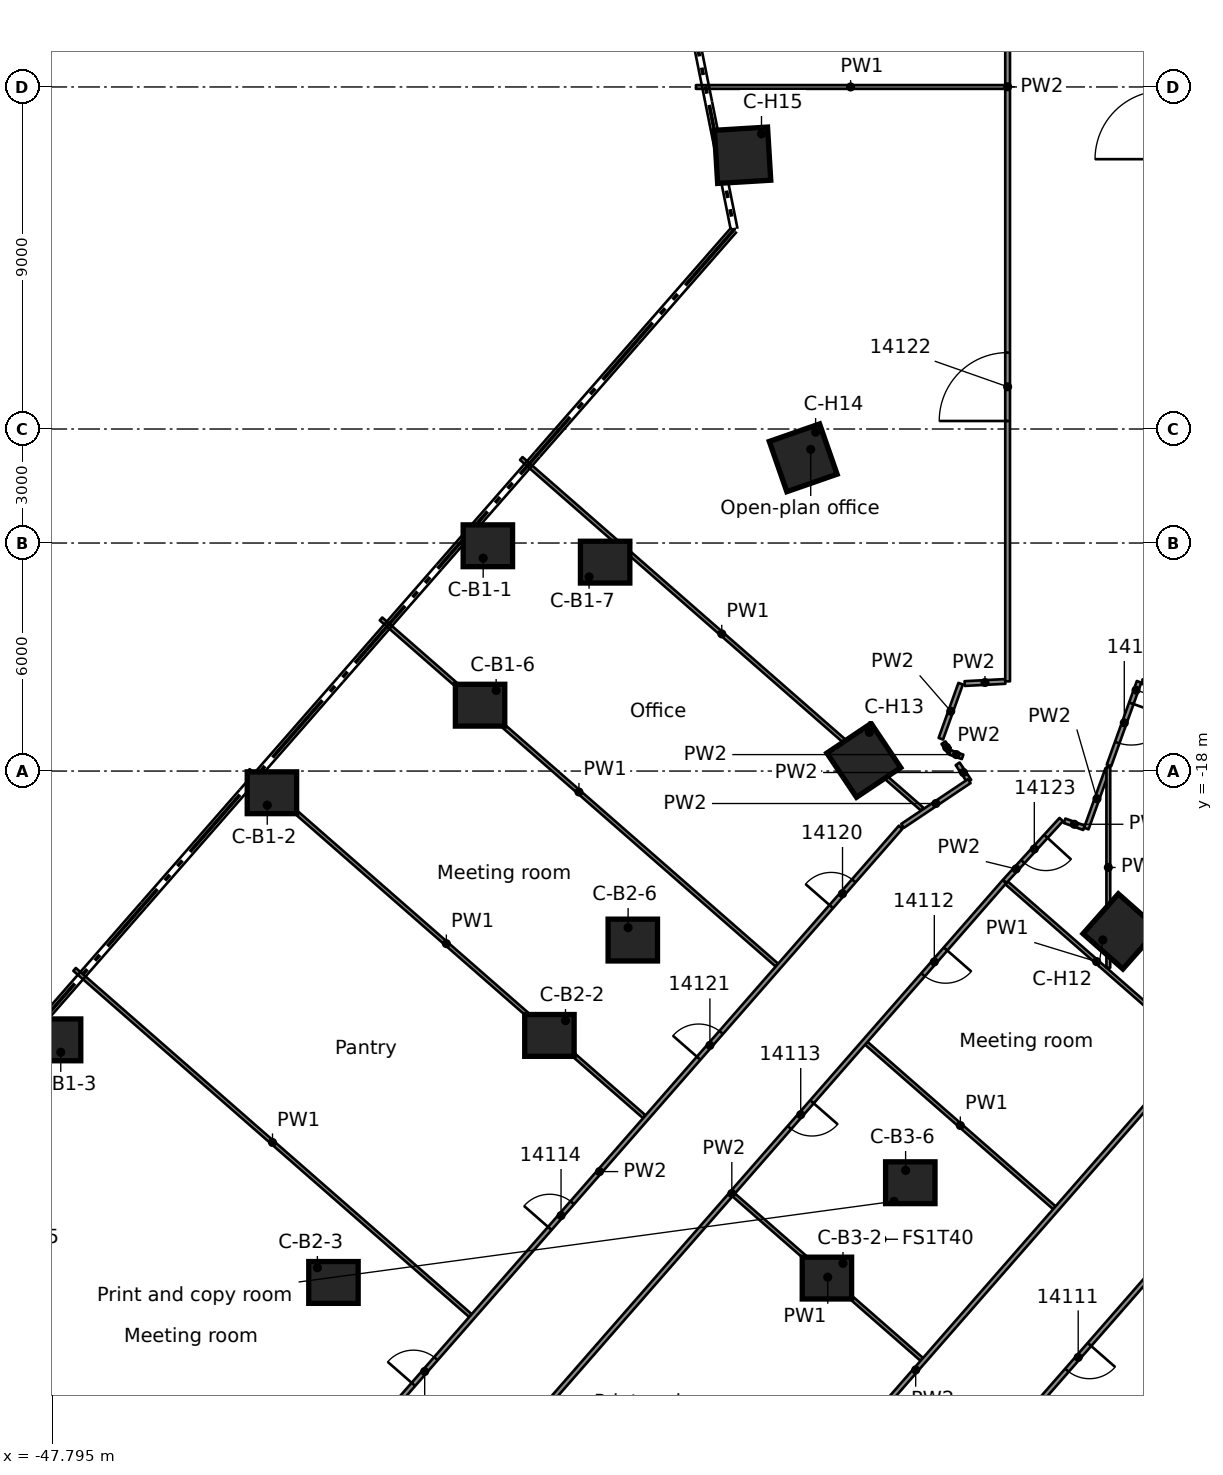
"""IFC4 building model, lengths in metres.
Left out: names, types, materials, properties, quantities, classifications, styles, units other than length and angle.
Written with IfcOpenShell. Run it as: python <this file> out.ifc"""

import sys

from ifc_helpers import new_model, si_unit, direction, frame, frame_2d, origin, origin_2d, place, context, subcontext, project, spatial, rectangle, extrude, element, fill, save


model = new_model("IFC4")
c1 = context("Model", 3, precision=1e-05, world=origin(), true_north=direction((0.0, 1.0)))
c2 = subcontext(c1, "Body", "Model", "MODEL_VIEW")
j1 = project(units=[si_unit("LENGTHUNIT", "METRE"), si_unit("PLANEANGLEUNIT", "RADIAN")], contexts=[c1])
p1 = place(None, origin())
s1 = spatial("IfcSite", under=j1, at=p1, CompositionType="ELEMENT")
p2 = place(p1, origin())
s2 = spatial("IfcBuilding", under=s1, at=p2, CompositionType="ELEMENT")
p3 = place(p2, frame((0.0, 0.0, 69.3)))
s3 = spatial("IfcBuildingStorey", under=s2, at=p3, CompositionType="ELEMENT", Elevation=69.3)
for number, where, z_axis, x_axis in (
    (1, (-36.327, -12.072, 0.0), (0.0, 0.0, 1.0), (1.0, 0.0, 0.0)),
    (2, (-42.009, -18.571, 0.0), (0.0, 0.0, 1.0), (1.0, 0.0, 0.0)),
    (3, (-47.689, -25.073, 0.0), (0.0, 0.0, 1.0), (1.0, 0.0, 0.0)),
    (4, (-36.532, -16.267, 0.0), (0.0, 0.0, 1.0), (1.0, 0.0, 0.0)),
    (5, (-33.241, -12.503, 0.0), (0.0, 0.0, 1.0), (1.0, 0.0, 0.0)),
    (6, (-34.707, -24.956, 0.0), (0.0, 0.0, 1.0), (1.0, 0.0, 0.0)),
    (7, (-40.39, -31.456, 0.0), (0.0, 0.0, 1.0), (1.0, 0.0, 0.0)),
    (8, (-32.513, -22.447, 0.0), (0.0, 0.0, 1.0), (1.0, 0.0, 0.0)),
    (9, (-27.405, -31.341, 0.0), (0.0, 0.0, 1.0), (1.0, 0.0, 0.0)),
    (10, (-25.211, -28.832, 0.0), (0.0, 0.0, 1.0), (1.0, 0.0, 0.0)),
):
    element("IfcColumn", number, at=place(p3, frame(where, z_axis=z_axis, x_axis=x_axis)), inside=s3, PredefinedType="COLUMN", context=c2, shape_type="SweptSolid", body=[
        extrude(rectangle(XDim=1.3, YDim=1.1, at=origin_2d()), origin(), (0.0, 0.0, 1.0), 3.5),
    ])
for number, where, z_axis, x_axis in (
    (11, (-19.677, -22.219, 0.0), (0.0, 0.0, 1.0), (-0.663, -0.749, 0.0)),
    (12, (-26.434, -17.718, 0.0), (0.0, 0.0, 1.0), (-0.831, -0.557, 0.0)),
    (13, (-28.029, -9.758, 0.0), (0.0, 0.0, 1.0), (-0.944, -0.329, 0.0)),
    (14, (-29.624, -1.797, 0.0), (0.0, 0.0, 1.0), (-0.998, -0.061, 0.0)),
):
    element("IfcColumn", number, at=place(p3, frame(where, z_axis=z_axis, x_axis=x_axis)), inside=s3, PredefinedType="COLUMN", context=c2, shape_type="SweptSolid", body=[
        extrude(rectangle(XDim=1.4, YDim=1.4, at=origin_2d()), origin(), (0.0, 0.0, 1.0), 3.5),
    ])
p4 = place(p3, frame((-24.338, -17.253, 0.0), z_axis=(0.0, 0.0, 1.0), x_axis=(0.55580542013, -0.831312417178, 0.0)))
e15 = element("IfcWall", 15, at=p4, inside=s3, PredefinedType="PARTITIONING", context=c2, shape_type="SweptSolid", body=[
    extrude(rectangle(XDim=0.306, YDim=0.125, at=frame_2d((0.153, 0.0))), origin(), (0.0, 0.0, 1.0), 3.03),
])
p5 = place(p3, frame((-23.965, -17.81, 0.0), z_axis=(0.0, 0.0, 1.0), x_axis=(0.55613676815, -0.831090786323, 0.0)))
e16 = element("IfcWall", 16, at=p5, inside=s3, PredefinedType="PARTITIONING", context=c2, shape_type="SweptSolid", body=[
    extrude(rectangle(XDim=0.549, YDim=0.125, at=frame_2d((0.274, 0.0))), origin(), (0.0, 0.0, 1.0), 3.03),
])
p6 = place(p3, frame((-47.202, -23.219, 0.0), z_axis=(0.0, 0.0, 1.0), x_axis=(0.752795260656, -0.658254734531, 0.0)))
e17 = element("IfcWall", 17, at=p6, inside=s3, PredefinedType="PARTITIONING", context=c2, shape_type="SweptSolid", body=[
    extrude(rectangle(XDim=13.836, YDim=0.1, at=frame_2d((6.918, 0.0))), origin(), (0.0, 0.0, 1.0), 3.03),
])
p7 = place(p3, frame((-42.628, -17.987, 0.0), z_axis=(0.0, 0.0, 1.0), x_axis=(0.752825840036, -0.65821976161, 0.0)))
e18 = element("IfcWall", 18, at=p7, inside=s3, PredefinedType="PARTITIONING", context=c2, shape_type="SweptSolid", body=[
    extrude(rectangle(XDim=13.837, YDim=0.1, at=frame_2d((6.918, 0.0))), origin(), (0.0, 0.0, 1.0), 3.03),
])
p8 = place(p3, frame((-29.858, -29.153, 0.0), z_axis=(0.0, 0.0, 1.0), x_axis=(0.752836606275, -0.658207447734, 0.0)))
e19 = element("IfcWall", 19, at=p8, inside=s3, PredefinedType="PARTITIONING", context=c2, shape_type="SweptSolid", body=[
    extrude(rectangle(XDim=6.574, YDim=0.1, at=frame_2d((3.287, 0.0))), origin(), (0.0, 0.0, 1.0), 3.03),
])
p9 = place(p3, frame((-39.139, -13.997, 0.0), z_axis=(0.0, 0.0, 1.0), x_axis=(0.752825840036, -0.65821976161, 0.0)))
e20 = element("IfcWall", 20, at=p9, inside=s3, PredefinedType="PARTITIONING", context=c2, shape_type="SweptSolid", body=[
    extrude(rectangle(XDim=13.837, YDim=0.1, at=frame_2d((6.918, 0.0))), origin(), (0.0, 0.0, 1.0), 3.03),
])
p10 = place(p3, frame((-26.369, -25.163, 0.0), z_axis=(0.0, 0.0, 1.0), x_axis=(0.752836606275, -0.658207447734, 0.0)))
e21 = element("IfcWall", 21, at=p10, inside=s3, PredefinedType="PARTITIONING", context=c2, shape_type="SweptSolid", body=[
    extrude(rectangle(XDim=6.574, YDim=0.1, at=frame_2d((3.287, 0.0))), origin(), (0.0, 0.0, 1.0), 3.03),
])
p11 = place(p3, frame((-19.067, -31.548, 0.0), z_axis=(0.0, 0.0, 1.0), x_axis=(0.752795260656, -0.658254734531, 0.0)))
e22 = element("IfcWall", 22, at=p11, inside=s3, PredefinedType="PARTITIONING", context=c2, shape_type="SweptSolid", body=[
    extrude(rectangle(XDim=13.836, YDim=0.1, at=frame_2d((6.918, 0.0))), origin(), (0.0, 0.0, 1.0), 3.03),
])
p12 = place(p3, frame((-35.448, -9.776, 0.0), z_axis=(0.0, 0.0, 1.0), x_axis=(0.752752526875, -0.658303602666, 0.0)))
e23 = element("IfcWall", 23, at=p12, inside=s3, PredefinedType="PARTITIONING", context=c2, shape_type="SweptSolid", body=[
    extrude(rectangle(XDim=14.018, YDim=0.1, at=frame_2d((7.009, 0.0))), origin(), (0.0, 0.0, 1.0), 3.03),
])
p13 = place(p3, frame((-22.678, -20.942, 0.0), z_axis=(0.0, 0.0, 1.0), x_axis=(0.752857732361, -0.658183283611, 0.0)))
e24 = element("IfcWall", 24, at=p13, inside=s3, PredefinedType="PARTITIONING", context=c2, shape_type="SweptSolid", body=[
    extrude(rectangle(XDim=6.295, YDim=0.1, at=frame_2d((3.147, 0.0))), origin(), (0.0, 0.0, 1.0), 3.03),
])
p14 = place(p3, frame((-21.151, -19.308, 0.0), z_axis=(0.0, 0.0, 1.0), x_axis=(0.940956165673, -0.33852842463, 0.0)))
e25 = element("IfcWall", 25, at=p14, inside=s3, PredefinedType="PARTITIONING", context=c2, shape_type="SweptSolid", body=[
    extrude(rectangle(XDim=0.543, YDim=0.125, at=frame_2d((0.271, 0.0))), origin(), (0.0, 0.0, 1.0), 3.03),
])
p15 = place(p3, frame((-24.168, -17.507, 0.0), z_axis=(0.0, 0.0, 1.0), x_axis=(0.94089620512, -0.338695041579, 0.0)))
e26 = element("IfcWall", 26, at=p15, inside=s3, PredefinedType="PARTITIONING", context=c2, shape_type="SweptSolid", body=[
    extrude(rectangle(XDim=0.354, YDim=0.125, at=frame_2d((0.177, 0.0))), origin(), (0.0, 0.0, 1.0), 3.03),
])
p16 = place(p3, frame((-22.712, -15.642, 0.0), z_axis=(0.0, 0.0, 1.0), x_axis=(-0.998632921129, -0.052271300329, 0.0)))
e27 = element("IfcWall", 27, at=p16, inside=s3, PredefinedType="PARTITIONING", context=c2, shape_type="SweptSolid", body=[
    extrude(rectangle(XDim=1.07, YDim=0.125, at=frame_2d((0.535, 0.0))), origin(), (0.0, 0.0, 1.0), 3.03),
])
p17 = place(p3, frame((-19.102, -15.651, 0.0), z_axis=(0.0, 0.0, 1.0), x_axis=(1.0, 0.0, 0.0)))
e28 = element("IfcWall", 28, at=p17, inside=s3, PredefinedType="PARTITIONING", context=c2, shape_type="SweptSolid", body=[
    extrude(rectangle(XDim=1.814, YDim=0.125, at=frame_2d((0.907, 0.0))), origin(), (0.0, 0.0, 1.0), 3.03),
])
p18 = place(p3, frame((-30.851, 0.0, 0.0), z_axis=(0.0, 0.0, 1.0), x_axis=(1.0, 0.0, 0.0)))
e29 = element("IfcWall", 29, at=p18, inside=s3, PredefinedType="PARTITIONING", context=c2, shape_type="SweptSolid", body=[
    extrude(rectangle(XDim=8.139, YDim=0.1, at=frame_2d((4.07, 0.0))), origin(), (0.0, 0.0, 1.0), 3.03),
])
p19 = place(p3, frame((-23.66, -18.266, 0.0), z_axis=(0.0, 0.0, 1.0), x_axis=(-0.83066036782, -0.556779447658, 0.0)))
e30 = element("IfcWall", 30, at=p19, inside=s3, PredefinedType="PARTITIONING", context=c2, shape_type="SweptSolid", body=[
    extrude(rectangle(XDim=2.112, YDim=0.125, at=frame_2d((1.056, 0.0))), origin(), (0.0, 0.0, 1.0), 3.03),
])
p20 = place(p3, frame((-21.239, -19.276, 0.0), z_axis=(0.0, 0.0, 1.0), x_axis=(-0.67486064048, -0.737945198461, 0.0)))
e31 = element("IfcWall", 31, at=p20, inside=s3, PredefinedType="PARTITIONING", context=c2, shape_type="SweptSolid", body=[
    extrude(rectangle(XDim=2.202, YDim=0.125, at=frame_2d((1.101, 0.0))), origin(), (0.0, 0.0, 1.0), 3.03),
])
p21 = place(p20, frame((0.6, 0.0, 0.0)))
e32 = element("IfcOpeningElement", 32, at=p21, cuts=e31, PredefinedType="OPENING", context=c2, shape_type="SweptSolid", body=[
    extrude(rectangle(XDim=0.9, YDim=2.1, at=frame_2d((0.45, 1.05))), frame((0.0, 0.073, 0.0), z_axis=(0.0, -1.0, 0.0), x_axis=(1.0, 0.0, 0.0)), (0.0, 0.0, 1.0), 0.145),
])
p22 = place(p3, frame((-15.464, -27.333, 0.0), z_axis=(0.0, 0.0, 1.0), x_axis=(-0.658239133646, -0.752808902004, 0.0)))
e33 = element("IfcWall", 33, at=p22, inside=s3, PredefinedType="PARTITIONING", context=c2, shape_type="SweptSolid", body=[
    extrude(rectangle(XDim=24.745, YDim=0.125, at=frame_2d((12.372, 0.0))), origin(), (0.0, 0.0, 1.0), 3.03),
])
p23 = place(p22, frame((2.288, 0.0, 0.0)))
e34 = element("IfcOpeningElement", 34, at=p23, cuts=e33, PredefinedType="OPENING", context=c2, shape_type="SweptSolid", body=[
    extrude(rectangle(XDim=1.1, YDim=2.1, at=frame_2d((0.55, 1.05))), frame((0.0, 0.073, 0.0), z_axis=(0.0, -1.0, 0.0), x_axis=(1.0, 0.0, 0.0)), (0.0, 0.0, 1.0), 0.145),
])
p24 = place(p22, frame((13.944, 0.0, 0.0)))
e35 = element("IfcOpeningElement", 35, at=p24, cuts=e33, PredefinedType="OPENING", context=c2, shape_type="SweptSolid", body=[
    extrude(rectangle(XDim=0.9, YDim=2.1, at=frame_2d((0.45, 1.05))), frame((0.0, 0.073, 0.0), z_axis=(0.0, -1.0, 0.0), x_axis=(1.0, 0.0, 0.0)), (0.0, 0.0, 1.0), 0.145),
])
p25 = place(p22, frame((7.646, 0.0, 0.0)))
e36 = element("IfcOpeningElement", 36, at=p25, cuts=e33, PredefinedType="OPENING", context=c2, shape_type="SweptSolid", body=[
    extrude(rectangle(XDim=0.9, YDim=2.1, at=frame_2d((0.45, 1.05))), frame((0.0, 0.073, 0.0), z_axis=(0.0, -1.0, 0.0), x_axis=(1.0, 0.0, 0.0)), (0.0, 0.0, 1.0), 0.145),
])
p26 = place(p22, frame((20.895, 0.0, 0.0)))
e37 = element("IfcOpeningElement", 37, at=p26, cuts=e33, PredefinedType="OPENING", context=c2, shape_type="SweptSolid", body=[
    extrude(rectangle(XDim=0.9, YDim=2.1, at=frame_2d((0.45, 1.05))), frame((0.0, 0.073, 0.0), z_axis=(0.0, -1.0, 0.0), x_axis=(1.0, 0.0, 0.0)), (0.0, 0.0, 1.0), 0.145),
])
p27 = place(p3, frame((-32.036, -41.726, 0.0), z_axis=(0.0, 0.0, 1.0), x_axis=(0.658231851406, 0.752815269369, 0.0)))
e38 = element("IfcWall", 38, at=p27, inside=s3, PredefinedType="PARTITIONING", context=c2, shape_type="SweptSolid", body=[
    extrude(rectangle(XDim=21.169, YDim=0.125, at=frame_2d((10.584, 0.0))), origin(), (0.0, 0.0, 1.0), 3.03),
])
p28 = place(p3, frame((-22.736, -20.913, 0.0), z_axis=(0.0, 0.0, 1.0), x_axis=(-0.658236458127, -0.752811241409, 0.0)))
e39 = element("IfcWall", 39, at=p28, inside=s3, PredefinedType="PARTITIONING", context=c2, shape_type="SweptSolid", body=[
    extrude(rectangle(XDim=21.79, YDim=0.125, at=frame_2d((10.895, 0.0))), origin(), (0.0, 0.0, 1.0), 3.03),
])
p29 = place(p28, frame((2.35, 0.0, 0.0)))
e40 = element("IfcOpeningElement", 40, at=p29, cuts=e39, PredefinedType="OPENING", context=c2, shape_type="SweptSolid", body=[
    extrude(rectangle(XDim=0.9, YDim=2.1, at=frame_2d((0.45, 1.05))), frame((0.0, 0.073, 0.0), z_axis=(0.0, -1.0, 0.0), x_axis=(1.0, 0.0, 0.0)), (0.0, 0.0, 1.0), 0.145),
])
p30 = place(p28, frame((7.691, 0.0, 0.0)))
e41 = element("IfcOpeningElement", 41, at=p30, cuts=e39, PredefinedType="OPENING", context=c2, shape_type="SweptSolid", body=[
    extrude(rectangle(XDim=0.9, YDim=2.1, at=frame_2d((0.45, 1.05))), frame((0.0, 0.073, 0.0), z_axis=(0.0, -1.0, 0.0), x_axis=(1.0, 0.0, 0.0)), (0.0, 0.0, 1.0), 0.145),
])
p31 = place(p3, frame((-41.314, -37.6, 0.0), z_axis=(0.0, 0.0, 1.0), x_axis=(0.658340906106, 0.752719902319, 0.0)))
e42 = element("IfcWall", 42, at=p31, inside=s3, PredefinedType="PARTITIONING", context=c2, shape_type="SweptSolid", body=[
    extrude(rectangle(XDim=24.075, YDim=0.125, at=frame_2d((12.038, 0.0))), origin(), (0.0, 0.0, 1.0), 3.03),
])
p32 = place(p31, frame((10.05, 0.0, 0.0)))
e43 = element("IfcOpeningElement", 43, at=p32, cuts=e42, PredefinedType="OPENING", context=c2, shape_type="SweptSolid", body=[
    extrude(rectangle(XDim=0.9, YDim=2.1, at=frame_2d((0.45, 1.05))), frame((0.0, 0.073, 0.0), z_axis=(0.0, -1.0, 0.0), x_axis=(1.0, 0.0, 0.0)), (0.0, 0.0, 1.0), 0.145),
])
p33 = place(p31, frame((4.6, 0.0, 0.0)))
e44 = element("IfcOpeningElement", 44, at=p33, cuts=e42, PredefinedType="OPENING", context=c2, shape_type="SweptSolid", body=[
    extrude(rectangle(XDim=0.9, YDim=2.1, at=frame_2d((0.45, 1.05))), frame((0.0, 0.073, 0.0), z_axis=(0.0, -1.0, 0.0), x_axis=(1.0, 0.0, 0.0)), (0.0, 0.0, 1.0), 0.145),
])
p34 = place(p31, frame((21.301, 0.0, 0.0)))
e45 = element("IfcOpeningElement", 45, at=p34, cuts=e42, PredefinedType="OPENING", context=c2, shape_type="SweptSolid", body=[
    extrude(rectangle(XDim=0.9, YDim=2.1, at=frame_2d((0.45, 1.05))), frame((0.0, 0.073, 0.0), z_axis=(0.0, -1.0, 0.0), x_axis=(1.0, 0.0, 0.0)), (0.0, 0.0, 1.0), 0.145),
])
p35 = place(p31, frame((16.0, 0.0, 0.0)))
e46 = element("IfcOpeningElement", 46, at=p35, cuts=e42, PredefinedType="OPENING", context=c2, shape_type="SweptSolid", body=[
    extrude(rectangle(XDim=0.9, YDim=2.1, at=frame_2d((0.45, 1.05))), frame((0.0, 0.073, 0.0), z_axis=(0.0, -1.0, 0.0), x_axis=(1.0, 0.0, 0.0)), (0.0, 0.0, 1.0), 0.145),
])
p36 = place(p3, frame((-19.191, -15.651, 0.0), z_axis=(0.0, 0.0, 1.0), x_axis=(-0.338423918893, -0.940993757217, 0.0)))
e47 = element("IfcWall", 47, at=p36, inside=s3, PredefinedType="PARTITIONING", context=c2, shape_type="SweptSolid", body=[
    extrude(rectangle(XDim=2.34, YDim=0.125, at=frame_2d((1.17, 0.0))), origin(), (0.0, 0.0, 1.0), 3.03),
])
p37 = place(p36, frame((0.6, 0.0, 0.0)))
e48 = element("IfcOpeningElement", 48, at=p37, cuts=e47, PredefinedType="OPENING", context=c2, shape_type="SweptSolid", body=[
    extrude(rectangle(XDim=1.1, YDim=2.1, at=frame_2d((0.55, 1.05))), frame((0.0, 0.073, 0.0), z_axis=(0.0, -1.0, 0.0), x_axis=(1.0, 0.0, 0.0)), (0.0, 0.0, 1.0), 0.145),
])
p38 = place(p3, frame((-20.58, -19.513, 0.0), z_axis=(0.0, 0.0, 1.0), x_axis=(0.338137852557, 0.941096590509, 0.0)))
e49 = element("IfcWall", 49, at=p38, inside=s3, PredefinedType="PARTITIONING", context=c2, shape_type="SweptSolid", body=[
    extrude(rectangle(XDim=1.665, YDim=0.125, at=frame_2d((0.833, 0.0))), origin(), (0.0, 0.0, 1.0), 3.03),
])
p39 = place(p3, frame((-24.407, -17.15, 0.0), z_axis=(0.0, 0.0, 1.0), x_axis=(0.338354498813, 0.941018720926, 0.0)))
e50 = element("IfcWall", 50, at=p39, inside=s3, PredefinedType="PARTITIONING", context=c2, shape_type="SweptSolid", body=[
    extrude(rectangle(XDim=1.54, YDim=0.125, at=frame_2d((0.77, 0.0))), origin(), (0.0, 0.0, 1.0), 3.03),
])
p40 = place(p3, frame((-20.0, -23.174, 0.0), z_axis=(0.0, 0.0, 1.0), x_axis=(0.0, 1.0, 0.0)))
e51 = element("IfcWall", 51, at=p40, inside=s3, PredefinedType="PARTITIONING", context=c2, shape_type="SweptSolid", body=[
    extrude(rectangle(XDim=5.274, YDim=0.1, at=frame_2d((2.637, 0.0))), origin(), (0.0, 0.0, 1.0), 3.03),
])
p41 = place(p3, frame((-22.65, -15.639, 0.0), z_axis=(0.0, 0.0, 1.0), x_axis=(0.0, 1.0, 0.0)))
e52 = element("IfcWall", 52, at=p41, inside=s3, PredefinedType="PARTITIONING", context=c2, shape_type="SweptSolid", body=[
    extrude(rectangle(XDim=31.29, YDim=0.125, at=frame_2d((15.645, 0.0))), origin(), (0.0, 0.0, 1.0), 3.03),
])
p42 = place(p41, frame((6.85, 0.0, 0.0)))
e53 = element("IfcOpeningElement", 53, at=p42, cuts=e52, PredefinedType="OPENING", context=c2, shape_type="SweptSolid", body=[
    extrude(rectangle(XDim=1.8, YDim=2.1, at=frame_2d((0.9, 1.05))), frame((0.0, 0.073, 0.0), z_axis=(0.0, -1.0, 0.0), x_axis=(1.0, 0.0, 0.0)), (0.0, 0.0, 1.0), 0.145),
])
p43 = place(p41, frame((22.489, 0.0, 0.0)))
e54 = element("IfcOpeningElement", 54, at=p43, cuts=e52, PredefinedType="OPENING", context=c2, shape_type="SweptSolid", body=[
    extrude(rectangle(XDim=1.8, YDim=2.1, at=frame_2d((0.9, 1.05))), frame((0.0, 0.073, 0.0), z_axis=(0.0, -1.0, 0.0), x_axis=(1.0, 0.0, 0.0)), (0.0, 0.0, 1.0), 0.145),
])
p44 = place(p25, origin())
e55 = element("IfcDoor", 55, at=p44, inside=s3, OperationType="SINGLE_SWING_LEFT", PredefinedType="DOOR", context=c2, shape_type="SweptSolid", body=[
    extrude(rectangle(XDim=0.9, YDim=2.1, at=frame_2d((0.45, 1.05))), frame((0.0, 0.025, 0.0), z_axis=(0.0, -1.0, 0.0), x_axis=(1.0, 0.0, 0.0)), (0.0, 0.0, 1.0), 0.05),
])
fill(e36, e55)
p45 = place(p29, origin())
e56 = element("IfcDoor", 56, at=p45, inside=s3, OperationType="SINGLE_SWING_LEFT", PredefinedType="DOOR", context=c2, shape_type="SweptSolid", body=[
    extrude(rectangle(XDim=0.9, YDim=2.1, at=frame_2d((0.45, 1.05))), frame((0.0, 0.025, 0.0), z_axis=(0.0, -1.0, 0.0), x_axis=(1.0, 0.0, 0.0)), (0.0, 0.0, 1.0), 0.05),
])
fill(e40, e56)
p46 = place(p30, origin())
e57 = element("IfcDoor", 57, at=p46, inside=s3, OperationType="SINGLE_SWING_LEFT", PredefinedType="DOOR", context=c2, shape_type="SweptSolid", body=[
    extrude(rectangle(XDim=0.9, YDim=2.1, at=frame_2d((0.45, 1.05))), frame((0.0, 0.025, 0.0), z_axis=(0.0, -1.0, 0.0), x_axis=(1.0, 0.0, 0.0)), (0.0, 0.0, 1.0), 0.05),
])
fill(e41, e57)
p47 = place(p32, origin())
e58 = element("IfcDoor", 58, at=p47, inside=s3, OperationType="SINGLE_SWING_LEFT", PredefinedType="DOOR", context=c2, shape_type="SweptSolid", body=[
    extrude(rectangle(XDim=0.9, YDim=2.1, at=frame_2d((0.45, 1.05))), frame((0.0, 0.025, 0.0), z_axis=(0.0, -1.0, 0.0), x_axis=(1.0, 0.0, 0.0)), (0.0, 0.0, 1.0), 0.05),
])
fill(e43, e58)
p48 = place(p33, origin())
e59 = element("IfcDoor", 59, at=p48, inside=s3, OperationType="SINGLE_SWING_LEFT", PredefinedType="DOOR", context=c2, shape_type="SweptSolid", body=[
    extrude(rectangle(XDim=0.9, YDim=2.1, at=frame_2d((0.45, 1.05))), frame((0.0, 0.025, 0.0), z_axis=(0.0, -1.0, 0.0), x_axis=(1.0, 0.0, 0.0)), (0.0, 0.0, 1.0), 0.05),
])
fill(e44, e59)
p49 = place(p34, origin())
e60 = element("IfcDoor", 60, at=p49, inside=s3, OperationType="SINGLE_SWING_RIGHT", PredefinedType="DOOR", context=c2, shape_type="SweptSolid", body=[
    extrude(rectangle(XDim=0.9, YDim=2.1, at=frame_2d((0.45, 1.05))), frame((0.0, 0.025, 0.0), z_axis=(0.0, -1.0, 0.0), x_axis=(1.0, 0.0, 0.0)), (0.0, 0.0, 1.0), 0.05),
])
fill(e45, e60)
p50 = place(p35, origin())
e61 = element("IfcDoor", 61, at=p50, inside=s3, OperationType="SINGLE_SWING_RIGHT", PredefinedType="DOOR", context=c2, shape_type="SweptSolid", body=[
    extrude(rectangle(XDim=0.9, YDim=2.1, at=frame_2d((0.45, 1.05))), frame((0.0, 0.025, 0.0), z_axis=(0.0, -1.0, 0.0), x_axis=(1.0, 0.0, 0.0)), (0.0, 0.0, 1.0), 0.05),
])
fill(e46, e61)
p51 = place(p42, origin())
e62 = element("IfcDoor", 62, at=p51, inside=s3, OperationType="DOUBLE_DOOR_SINGLE_SWING", PredefinedType="DOOR", context=c2, shape_type="SweptSolid", body=[
    extrude(rectangle(XDim=1.8, YDim=2.1, at=frame_2d((0.9, 1.05))), frame((0.0, 0.025, 0.0), z_axis=(0.0, -1.0, 0.0), x_axis=(1.0, 0.0, 0.0)), (0.0, 0.0, 1.0), 0.05),
])
fill(e53, e62)
p52 = place(p21, origin())
e63 = element("IfcDoor", 63, at=p52, inside=s3, OperationType="SINGLE_SWING_LEFT", PredefinedType="DOOR", context=c2, shape_type="SweptSolid", body=[
    extrude(rectangle(XDim=0.9, YDim=2.1, at=frame_2d((0.45, 1.05))), frame((0.0, 0.025, 0.0), z_axis=(0.0, -1.0, 0.0), x_axis=(1.0, 0.0, 0.0)), (0.0, 0.0, 1.0), 0.05),
])
fill(e32, e63)
p53 = place(p37, origin())
e64 = element("IfcDoor", 64, at=p53, inside=s3, OperationType="SINGLE_SWING_LEFT", PredefinedType="DOOR", context=c2, shape_type="SweptSolid", body=[
    extrude(rectangle(XDim=1.1, YDim=2.1, at=frame_2d((0.55, 1.05))), frame((0.0, 0.025, 0.0), z_axis=(0.0, -1.0, 0.0), x_axis=(1.0, 0.0, 0.0)), (0.0, 0.0, 1.0), 0.05),
])
fill(e48, e64)
save(model, sys.argv[1])
